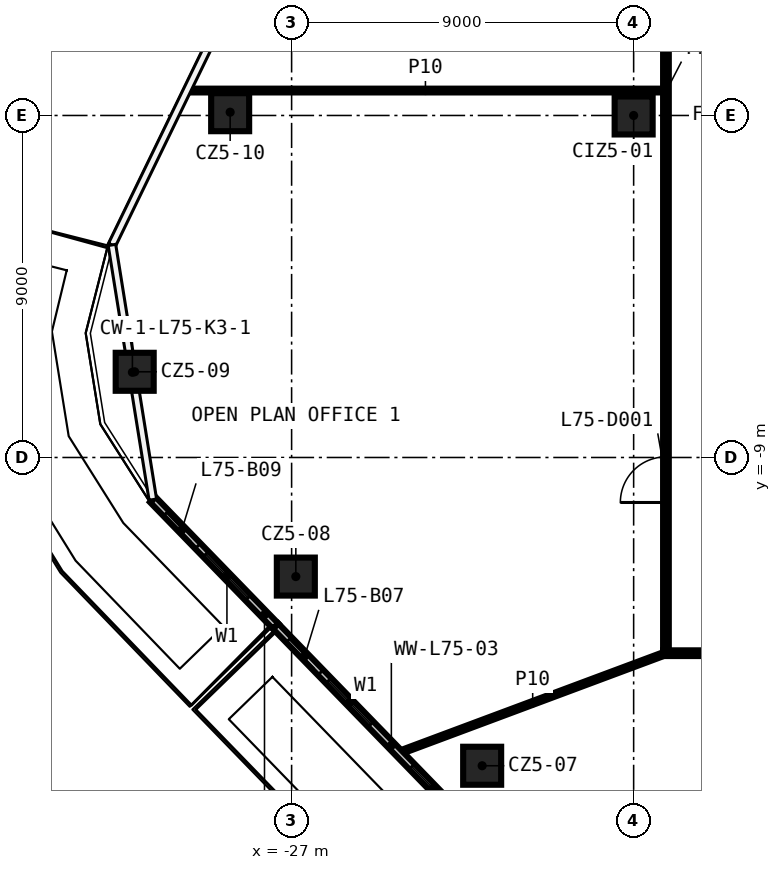
"""IFC4 building model, lengths in metres.
Left out: names, types, materials, properties, quantities, classifications, styles, units other than length and angle.
Written with IfcOpenShell. Run it as: python <this file> out.ifc"""

import sys

from ifc_helpers import new_model, si_unit, direction, frame, frame_2d, origin, origin_2d, place, context, subcontext, project, spatial, rectangle, extrude, element, fill, save


model = new_model("IFC4")
c1 = context("Model", 3, precision=1e-05, world=origin(), true_north=direction((0.0, 1.0)))
c2 = subcontext(c1, "Body", "Model", "MODEL_VIEW")
j1 = project(units=[si_unit("LENGTHUNIT", "METRE"), si_unit("PLANEANGLEUNIT", "RADIAN")], contexts=[c1])
p1 = place(None, origin())
s1 = spatial("IfcSite", under=j1, at=p1, CompositionType="ELEMENT")
p2 = place(p1, origin())
s2 = spatial("IfcBuilding", under=s1, at=p2, CompositionType="ELEMENT")
p3 = place(p2, frame((0.0, 0.0, 348.8)))
s3 = spatial("IfcBuildingStorey", under=s2, at=p3, CompositionType="ELEMENT", Elevation=348.8)
for number, where, z_axis, x_axis in (
    (1, (-21.986, -17.112, 0.0), (0.0, 0.0, 1.0), (1.0, 0.0, 0.0)),
    (2, (-26.889, -12.134, 0.0), (0.0, 0.0, 1.0), (1.0, 0.0, 0.0)),
    (3, (-31.129, -6.745, 0.0), (0.0, 0.0, 1.0), (1.0, 0.0, 0.0)),
    (4, (-28.617, 0.086, 0.0), (0.0, 0.0, 1.0), (1.0, 0.0, 0.0)),
    (5, (-18.0, 0.0, 0.0), (0.0, 0.0, 1.0), (1.0, 0.0, 0.0)),
):
    element("IfcColumn", number, at=place(p3, frame(where, z_axis=z_axis, x_axis=x_axis)), inside=s3, PredefinedType="COLUMN", context=c2, shape_type="SweptSolid", body=[
        extrude(rectangle(XDim=1.0, YDim=1.0, at=origin_2d()), origin(), (0.0, 0.0, 1.0), 3.7),
    ])
p4 = place(p3, frame((17.225, -14.15, 0.0), z_axis=(0.0, 0.0, 1.0), x_axis=(-1.0, 0.0, 0.0)))
e6 = element("IfcWall", 6, at=p4, inside=s3, PredefinedType="PARTITIONING", context=c2, shape_type="SweptSolid", body=[
    extrude(rectangle(XDim=34.45, YDim=0.15, at=frame_2d((17.225, 0.0))), origin(), (0.0, 0.0, 1.0), 3.7),
])
p5 = place(p4, frame((31.464, 0.0, 0.0)))
e7 = element("IfcOpeningElement", 7, at=p5, cuts=e6, PredefinedType="OPENING", context=c2, shape_type="SweptSolid", body=[
    extrude(rectangle(XDim=1.2, YDim=2.1, at=frame_2d((0.6, 1.05))), frame((0.0, 0.085, 0.0), z_axis=(0.0, -1.0, 0.0), x_axis=(1.0, 0.0, 0.0)), (0.0, 0.0, 1.0), 0.17),
])
p6 = place(p4, frame((24.546, 0.0, 0.0)))
e8 = element("IfcOpeningElement", 8, at=p6, cuts=e6, PredefinedType="OPENING", context=c2, shape_type="SweptSolid", body=[
    extrude(rectangle(XDim=1.2, YDim=2.1, at=frame_2d((0.6, 1.05))), frame((0.0, 0.085, 0.0), z_axis=(0.0, -1.0, 0.0), x_axis=(1.0, 0.0, 0.0)), (0.0, 0.0, 1.0), 0.17),
])
p7 = place(p4, frame((19.962, 0.0, 0.0)))
e9 = element("IfcOpeningElement", 9, at=p7, cuts=e6, PredefinedType="OPENING", context=c2, shape_type="SweptSolid", body=[
    extrude(rectangle(XDim=1.2, YDim=2.1, at=frame_2d((0.6, 1.05))), frame((0.0, 0.085, 0.0), z_axis=(0.0, -1.0, 0.0), x_axis=(1.0, 0.0, 0.0)), (0.0, 0.0, 1.0), 0.17),
])
p8 = place(p4, frame((15.375, 0.0, 0.0)))
e10 = element("IfcOpeningElement", 10, at=p8, cuts=e6, PredefinedType="OPENING", context=c2, shape_type="SweptSolid", body=[
    extrude(rectangle(XDim=1.2, YDim=2.1, at=frame_2d((0.6, 1.05))), frame((0.0, 0.085, 0.0), z_axis=(0.0, -1.0, 0.0), x_axis=(1.0, 0.0, 0.0)), (0.0, 0.0, 1.0), 0.17),
])
p9 = place(p4, frame((10.788, 0.0, 0.0)))
e11 = element("IfcOpeningElement", 11, at=p9, cuts=e6, PredefinedType="OPENING", context=c2, shape_type="SweptSolid", body=[
    extrude(rectangle(XDim=1.2, YDim=2.1, at=frame_2d((0.6, 1.05))), frame((0.0, 0.085, 0.0), z_axis=(0.0, -1.0, 0.0), x_axis=(1.0, 0.0, 0.0)), (0.0, 0.0, 1.0), 0.17),
])
p10 = place(p4, frame((6.202, 0.0, 0.0)))
e12 = element("IfcOpeningElement", 12, at=p10, cuts=e6, PredefinedType="OPENING", context=c2, shape_type="SweptSolid", body=[
    extrude(rectangle(XDim=1.2, YDim=2.1, at=frame_2d((0.6, 1.05))), frame((0.0, 0.085, 0.0), z_axis=(0.0, -1.0, 0.0), x_axis=(1.0, 0.0, 0.0)), (0.0, 0.0, 1.0), 0.17),
])
p11 = place(p4, frame((1.897, 0.0, 0.0)))
e13 = element("IfcOpeningElement", 13, at=p11, cuts=e6, PredefinedType="OPENING", context=c2, shape_type="SweptSolid", body=[
    extrude(rectangle(XDim=1.2, YDim=2.1, at=frame_2d((0.6, 1.05))), frame((0.0, 0.085, 0.0), z_axis=(0.0, -1.0, 0.0), x_axis=(1.0, 0.0, 0.0)), (0.0, 0.0, 1.0), 0.17),
])
p12 = place(p3, frame((-29.732, 0.656, 0.0), z_axis=(0.0, 0.0, 1.0), x_axis=(1.0, 0.0, 0.0)))
e14 = element("IfcWall", 14, at=p12, inside=s3, PredefinedType="PARTITIONING", context=c2, shape_type="SweptSolid", body=[
    extrude(rectangle(XDim=12.507, YDim=0.1, at=frame_2d((6.253, 0.0))), origin(), (0.0, 0.0, 1.0), 3.7),
])
p13 = place(p3, frame((-24.164, -16.767, 0.0), z_axis=(0.0, 0.0, 1.0), x_axis=(0.936910882714, 0.349568302127, 0.0)))
e15 = element("IfcWall", 15, at=p13, inside=s3, PredefinedType="PARTITIONING", context=c2, shape_type="SweptSolid", body=[
    extrude(rectangle(XDim=7.486, YDim=0.1, at=frame_2d((3.743, 0.0))), origin(), (0.0, 0.0, 1.0), 3.7),
])
p14 = place(p3, frame((-17.15, -14.075, 0.0), z_axis=(0.0, 0.0, 1.0), x_axis=(0.0, 1.0, 0.0)))
e16 = element("IfcWall", 16, at=p14, inside=s3, PredefinedType="PARTITIONING", context=c2, shape_type="SweptSolid", body=[
    extrude(rectangle(XDim=28.15, YDim=0.15, at=frame_2d((14.075, 0.0))), origin(), (0.0, 0.0, 1.0), 3.7),
])
p15 = place(p14, frame((3.891, 0.0, 0.0)))
e17 = element("IfcOpeningElement", 17, at=p15, cuts=e16, PredefinedType="OPENING", context=c2, shape_type="SweptSolid", body=[
    extrude(rectangle(XDim=1.2, YDim=2.1, at=frame_2d((0.6, 1.05))), frame((0.0, 0.085, 0.0), z_axis=(0.0, -1.0, 0.0), x_axis=(1.0, 0.0, 0.0)), (0.0, 0.0, 1.0), 0.17),
])
p16 = place(p14, frame((24.312, 0.0, 0.0)))
e18 = element("IfcOpeningElement", 18, at=p16, cuts=e16, PredefinedType="OPENING", context=c2, shape_type="SweptSolid", body=[
    extrude(rectangle(XDim=1.2, YDim=2.1, at=frame_2d((0.6, 1.05))), frame((0.0, 0.085, 0.0), z_axis=(0.0, -1.0, 0.0), x_axis=(1.0, 0.0, 0.0)), (0.0, 0.0, 1.0), 0.17),
])
p17 = place(p3, frame((-27.422, -13.438, 0.0), z_axis=(0.0, 0.0, 1.0), x_axis=(0.696377931732, -0.717675258175, 0.0)))
e19 = element("IfcWall", 19, at=p17, inside=s3, PredefinedType="SOLIDWALL", context=c2, shape_type="SweptSolid", body=[
    extrude(rectangle(XDim=9.297, YDim=0.2, at=frame_2d((4.648, 0.0))), origin(), (0.0, 0.0, 1.0), 3.7),
])
p18 = place(p17, frame((2.0, 0.0, 0.6)))
e20 = element("IfcOpeningElement", 20, at=p18, cuts=e19, PredefinedType="OPENING", context=c2, shape_type="SweptSolid", body=[
    extrude(rectangle(XDim=1.6, YDim=2.4, at=frame_2d((0.8, 1.2))), frame((0.0, 0.11, 0.0), z_axis=(0.0, -1.0, 0.0), x_axis=(1.0, 0.0, 0.0)), (0.0, 0.0, 1.0), 0.22),
])
p19 = place(p17, frame((0.5, 0.0, 0.0)))
e21 = element("IfcOpeningElement", 21, at=p19, cuts=e19, PredefinedType="OPENING", context=c2, shape_type="SweptSolid", body=[
    extrude(rectangle(XDim=1.2, YDim=2.4, at=frame_2d((0.6, 1.2))), frame((0.0, 0.11, 0.0), z_axis=(0.0, -1.0, 0.0), x_axis=(1.0, 0.0, 0.0)), (0.0, 0.0, 1.0), 0.22),
])
p20 = place(p17, frame((5.148, 0.0, 0.6)))
e22 = element("IfcOpeningElement", 22, at=p20, cuts=e19, PredefinedType="OPENING", context=c2, shape_type="SweptSolid", body=[
    extrude(rectangle(XDim=1.6, YDim=2.4, at=frame_2d((0.8, 1.2))), frame((0.0, 0.11, 0.0), z_axis=(0.0, -1.0, 0.0), x_axis=(1.0, 0.0, 0.0)), (0.0, 0.0, 1.0), 0.22),
])
p21 = place(p17, frame((7.249, 0.0, 0.0)))
e23 = element("IfcOpeningElement", 23, at=p21, cuts=e19, PredefinedType="OPENING", context=c2, shape_type="SweptSolid", body=[
    extrude(rectangle(XDim=1.2, YDim=2.4, at=frame_2d((0.6, 1.2))), frame((0.0, 0.11, 0.0), z_axis=(0.0, -1.0, 0.0), x_axis=(1.0, 0.0, 0.0)), (0.0, 0.0, 1.0), 0.22),
])
p22 = place(p3, frame((-30.652, -10.109, 0.0), z_axis=(0.0, 0.0, 1.0), x_axis=(0.696367753757, -0.717685133974, 0.0)))
e24 = element("IfcWall", 24, at=p22, inside=s3, PredefinedType="SOLIDWALL", context=c2, shape_type="SweptSolid", body=[
    extrude(rectangle(XDim=4.638, YDim=0.2, at=frame_2d((2.319, 0.0))), origin(), (0.0, 0.0, 1.0), 3.7),
])
p23 = place(p22, frame((2.0, 0.0, 0.6)))
e25 = element("IfcOpeningElement", 25, at=p23, cuts=e24, PredefinedType="OPENING", context=c2, shape_type="SweptSolid", body=[
    extrude(rectangle(XDim=1.6, YDim=2.4, at=frame_2d((0.8, 1.2))), frame((0.0, 0.11, 0.0), z_axis=(0.0, -1.0, 0.0), x_axis=(1.0, 0.0, 0.0)), (0.0, 0.0, 1.0), 0.22),
])
p24 = place(p22, frame((0.5, 0.0, 0.0)))
e26 = element("IfcOpeningElement", 26, at=p24, cuts=e24, PredefinedType="OPENING", context=c2, shape_type="SweptSolid", body=[
    extrude(rectangle(XDim=1.2, YDim=2.4, at=frame_2d((0.6, 1.2))), frame((0.0, 0.11, 0.0), z_axis=(0.0, -1.0, 0.0), x_axis=(1.0, 0.0, 0.0)), (0.0, 0.0, 1.0), 0.22),
])
p25 = place(p15, origin())
e27 = element("IfcDoor", 27, at=p25, inside=s3, OperationType="SINGLE_SWING_RIGHT", PredefinedType="DOOR", context=c2, shape_type="SweptSolid", body=[
    extrude(rectangle(XDim=1.2, YDim=2.1, at=frame_2d((0.6, 1.05))), frame((0.0, 0.025, 0.0), z_axis=(0.0, -1.0, 0.0), x_axis=(1.0, 0.0, 0.0)), (0.0, 0.0, 1.0), 0.05),
])
fill(e17, e27)
p26 = place(p18, origin())
e28 = element("IfcWindow", 28, at=p26, inside=s3, PartitioningType="SINGLE_PANEL", PredefinedType="WINDOW", context=c2, shape_type="SweptSolid", body=[
    extrude(rectangle(XDim=1.6, YDim=2.4, at=frame_2d((0.8, 1.2))), frame((0.0, 0.03, 0.0), z_axis=(0.0, -1.0, 0.0), x_axis=(1.0, 0.0, 0.0)), (0.0, 0.0, 1.0), 0.06),
])
fill(e20, e28)
p27 = place(p19, origin())
e29 = element("IfcDoor", 29, at=p27, inside=s3, OperationType="SLIDING_TO_LEFT", PredefinedType="DOOR", context=c2, shape_type="SweptSolid", body=[
    extrude(rectangle(XDim=1.2, YDim=2.4, at=frame_2d((0.6, 1.2))), frame((0.0, 0.025, 0.0), z_axis=(0.0, -1.0, 0.0), x_axis=(1.0, 0.0, 0.0)), (0.0, 0.0, 1.0), 0.05),
])
fill(e21, e29)
p28 = place(p20, origin())
e30 = element("IfcWindow", 30, at=p28, inside=s3, PartitioningType="SINGLE_PANEL", PredefinedType="WINDOW", context=c2, shape_type="SweptSolid", body=[
    extrude(rectangle(XDim=1.6, YDim=2.4, at=frame_2d((0.8, 1.2))), frame((0.0, 0.03, 0.0), z_axis=(0.0, -1.0, 0.0), x_axis=(1.0, 0.0, 0.0)), (0.0, 0.0, 1.0), 0.06),
])
fill(e22, e30)
p29 = place(p23, origin())
e31 = element("IfcWindow", 31, at=p29, inside=s3, PartitioningType="SINGLE_PANEL", PredefinedType="WINDOW", context=c2, shape_type="SweptSolid", body=[
    extrude(rectangle(XDim=1.6, YDim=2.4, at=frame_2d((0.8, 1.2))), frame((0.0, 0.03, 0.0), z_axis=(0.0, -1.0, 0.0), x_axis=(1.0, 0.0, 0.0)), (0.0, 0.0, 1.0), 0.06),
])
fill(e25, e31)
p30 = place(p24, origin())
e32 = element("IfcDoor", 32, at=p30, inside=s3, OperationType="SLIDING_TO_LEFT", PredefinedType="DOOR", context=c2, shape_type="SweptSolid", body=[
    extrude(rectangle(XDim=1.2, YDim=2.4, at=frame_2d((0.6, 1.2))), frame((0.0, 0.025, 0.0), z_axis=(0.0, -1.0, 0.0), x_axis=(1.0, 0.0, 0.0)), (0.0, 0.0, 1.0), 0.05),
])
fill(e26, e32)
save(model, sys.argv[1])
